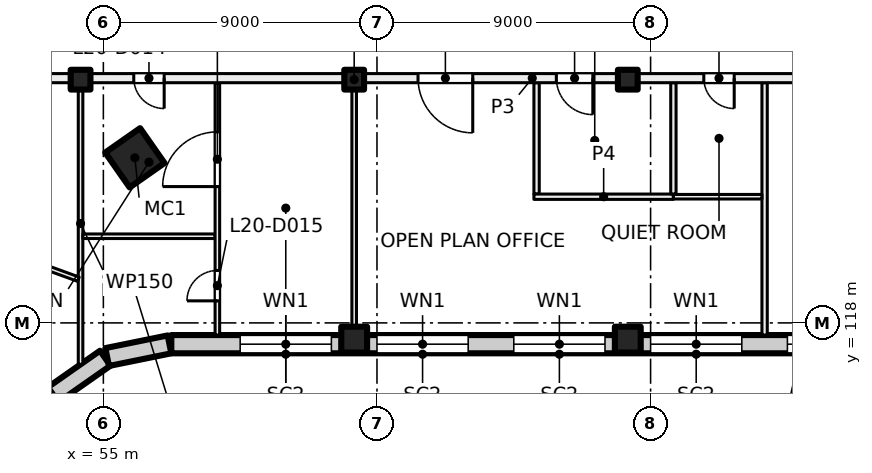
"""IFC4 building model, lengths in metres.
Left out: names, types, materials, properties, quantities, classifications, styles, units other than length and angle.
Written with IfcOpenShell. Run it as: python <this file> out.ifc"""

import sys

from ifc_helpers import new_model, si_unit, direction, frame, frame_2d, origin, origin_2d, place, context, subcontext, project, spatial, rectangle, hollow_rectangle, extrude, element, fill, save


model = new_model("IFC4")
c1 = context("Model", 3, precision=1e-05, world=origin(), true_north=direction((0.0, 1.0)))
c2 = subcontext(c1, "Body", "Model", "MODEL_VIEW")
j1 = project(units=[si_unit("LENGTHUNIT", "METRE"), si_unit("PLANEANGLEUNIT", "RADIAN")], contexts=[c1])
p1 = place(None, origin())
s1 = spatial("IfcSite", under=j1, at=p1, CompositionType="ELEMENT")
p2 = place(p1, origin())
s2 = spatial("IfcBuilding", under=s1, at=p2, CompositionType="ELEMENT")
p3 = place(p2, frame((0.0, 0.0, 89.0)))
s3 = spatial("IfcBuildingStorey", under=s2, at=p3, CompositionType="ELEMENT", Elevation=89.0)
p4 = place(p3, frame((56.036, 123.43, 0.0), z_axis=(0.0, 0.0, 1.0), x_axis=(0.573576436351, -0.819152044289, 0.0)))
e1 = element("IfcColumn", 1, at=p4, inside=s3, PredefinedType="COLUMN", context=c2, shape_type="SweptSolid", body=[
    extrude(hollow_rectangle(XDim=1.4, YDim=1.4, WallThickness=0.04, at=origin_2d()), origin(), (0.0, 0.0, 1.0), 4.0),
])
for number, where, z_axis, x_axis in (
    (2, (54.25, 126.0, 0.0), (0.0, 0.0, 1.0), (1.0, 0.0, 0.0)),
    (3, (63.25, 126.0, 0.0), (0.0, 0.0, 1.0), (1.0, 0.0, 0.0)),
    (4, (72.25, 126.0, 0.0), (0.0, 0.0, 1.0), (1.0, 0.0, 0.0)),
):
    element("IfcColumn", number, at=place(p3, frame(where, z_axis=z_axis, x_axis=x_axis)), inside=s3, PredefinedType="COLUMN", context=c2, shape_type="SweptSolid", body=[
        extrude(rectangle(XDim=0.65, YDim=0.65, at=origin_2d()), origin(), (0.0, 0.0, 1.0), 4.0),
    ])
for number, where, z_axis, x_axis in (
    (5, (63.25, 117.45, 0.0), (0.0, 0.0, 1.0), (1.0, 0.0, 0.0)),
    (6, (72.25, 117.45, 0.0), (0.0, 0.0, 1.0), (1.0, 0.0, 0.0)),
):
    element("IfcColumn", number, at=place(p3, frame(where, z_axis=z_axis, x_axis=x_axis)), inside=s3, PredefinedType="COLUMN", context=c2, shape_type="SweptSolid", body=[
        extrude(rectangle(XDim=0.85, YDim=0.85, at=origin_2d()), origin(), (0.0, 0.0, 1.0), 4.0),
    ])
p5 = place(p3, frame((53.305, 115.578, 0.0), z_axis=(0.0, 0.0, 1.0), x_axis=(-0.522402266438, -0.852699168535, 0.0)))
e7 = element("IfcWall", 7, at=p5, inside=s3, PredefinedType="SOLIDWALL", context=c2, shape_type="SweptSolid", body=[
    extrude(rectangle(XDim=2.042, YDim=0.6, at=frame_2d((1.021, 0.0))), origin(), (0.0, 0.0, 1.0), 3.625),
])
for number, where, z_axis, x_axis in (
    (8, (55.062, 116.839, 0.0), (0.0, 0.0, 1.0), (-0.819, -0.574, 0.0)),
    (9, (57.175, 117.294, 0.0), (0.0, 0.0, 1.0), (-0.98, -0.199, 0.0)),
):
    element("IfcWall", number, at=place(p3, frame(where, z_axis=z_axis, x_axis=x_axis)), inside=s3, PredefinedType="SOLIDWALL", context=c2, shape_type="SweptSolid", body=[
        extrude(rectangle(XDim=2.092, YDim=0.6, at=frame_2d((1.046, 0.0))), origin(), (0.0, 0.0, 1.0), 3.625),
    ])
p6 = place(p3, frame((90.98, 117.3, 0.0), z_axis=(0.0, 0.0, 1.0), x_axis=(-1.0, 0.0, 0.0)))
e10 = element("IfcWall", 10, at=p6, inside=s3, PredefinedType="SOLIDWALL", context=c2, shape_type="SweptSolid", body=[
    extrude(rectangle(XDim=33.745, YDim=0.6, at=frame_2d((16.873, 0.0))), origin(), (0.0, 0.0, 1.0), 3.625),
])
p7 = place(p6, frame((1.48, 0.0, 0.9)))
e11 = element("IfcOpeningElement", 11, at=p7, cuts=e10, PredefinedType="OPENING", context=c2, shape_type="SweptSolid", body=[
    extrude(rectangle(XDim=3.0, YDim=2.4, at=frame_2d((1.5, 1.2))), frame((0.0, 0.31, 0.0), z_axis=(0.0, -1.0, 0.0), x_axis=(1.0, 0.0, 0.0)), (0.0, 0.0, 1.0), 0.62),
])
p8 = place(p6, frame((5.98, 0.0, 0.9)))
e12 = element("IfcOpeningElement", 12, at=p8, cuts=e10, PredefinedType="OPENING", context=c2, shape_type="SweptSolid", body=[
    extrude(rectangle(XDim=3.0, YDim=2.4, at=frame_2d((1.5, 1.2))), frame((0.0, 0.31, 0.0), z_axis=(0.0, -1.0, 0.0), x_axis=(1.0, 0.0, 0.0)), (0.0, 0.0, 1.0), 0.62),
])
p9 = place(p6, frame((10.48, 0.0, 0.9)))
e13 = element("IfcOpeningElement", 13, at=p9, cuts=e10, PredefinedType="OPENING", context=c2, shape_type="SweptSolid", body=[
    extrude(rectangle(XDim=3.0, YDim=2.4, at=frame_2d((1.5, 1.2))), frame((0.0, 0.31, 0.0), z_axis=(0.0, -1.0, 0.0), x_axis=(1.0, 0.0, 0.0)), (0.0, 0.0, 1.0), 0.62),
])
p10 = place(p6, frame((14.98, 0.0, 0.9)))
e14 = element("IfcOpeningElement", 14, at=p10, cuts=e10, PredefinedType="OPENING", context=c2, shape_type="SweptSolid", body=[
    extrude(rectangle(XDim=3.0, YDim=2.4, at=frame_2d((1.5, 1.2))), frame((0.0, 0.31, 0.0), z_axis=(0.0, -1.0, 0.0), x_axis=(1.0, 0.0, 0.0)), (0.0, 0.0, 1.0), 0.62),
])
p11 = place(p6, frame((19.48, 0.0, 0.9)))
e15 = element("IfcOpeningElement", 15, at=p11, cuts=e10, PredefinedType="OPENING", context=c2, shape_type="SweptSolid", body=[
    extrude(rectangle(XDim=3.0, YDim=2.4, at=frame_2d((1.5, 1.2))), frame((0.0, 0.31, 0.0), z_axis=(0.0, -1.0, 0.0), x_axis=(1.0, 0.0, 0.0)), (0.0, 0.0, 1.0), 0.62),
])
p12 = place(p6, frame((23.98, 0.0, 0.9)))
e16 = element("IfcOpeningElement", 16, at=p12, cuts=e10, PredefinedType="OPENING", context=c2, shape_type="SweptSolid", body=[
    extrude(rectangle(XDim=3.0, YDim=2.4, at=frame_2d((1.5, 1.2))), frame((0.0, 0.31, 0.0), z_axis=(0.0, -1.0, 0.0), x_axis=(1.0, 0.0, 0.0)), (0.0, 0.0, 1.0), 0.62),
])
p13 = place(p6, frame((28.48, 0.0, 0.9)))
e17 = element("IfcOpeningElement", 17, at=p13, cuts=e10, PredefinedType="OPENING", context=c2, shape_type="SweptSolid", body=[
    extrude(rectangle(XDim=3.0, YDim=2.4, at=frame_2d((1.5, 1.2))), frame((0.0, 0.31, 0.0), z_axis=(0.0, -1.0, 0.0), x_axis=(1.0, 0.0, 0.0)), (0.0, 0.0, 1.0), 0.62),
])
p14 = place(p3, frame((54.25, 116.637, 0.0), z_axis=(0.0, 0.0, 1.0), x_axis=(0.0, 1.0, 0.0)))
e18 = element("IfcWall", 18, at=p14, inside=s3, PredefinedType="PARTITIONING", context=c2, shape_type="SweptSolid", body=[
    extrude(rectangle(XDim=9.263, YDim=0.15, at=frame_2d((4.631, 0.0))), origin(), (0.0, 0.0, 1.0), 3.625),
])
p15 = place(p3, frame((54.18, 119.436, 0.0), z_axis=(0.0, 0.0, 1.0), x_axis=(-0.939669476286, 0.342083725624, 0.0)))
e19 = element("IfcWall", 19, at=p15, inside=s3, PredefinedType="PARTITIONING", context=c2, shape_type="SweptSolid", body=[
    extrude(rectangle(XDim=8.516, YDim=0.15, at=frame_2d((4.258, 0.0))), origin(), (0.0, 0.0, 1.0), 3.625),
])
p16 = place(p3, frame((54.325, 120.85, 0.0), z_axis=(0.0, 0.0, 1.0), x_axis=(1.0, 0.0, 0.0)))
e20 = element("IfcWall", 20, at=p16, inside=s3, PredefinedType="PARTITIONING", context=c2, shape_type="SweptSolid", body=[
    extrude(rectangle(XDim=4.35, YDim=0.15, at=frame_2d((2.175, 0.0))), origin(), (0.0, 0.0, 1.0), 3.625),
])
p17 = place(p3, frame((58.75, 117.6, 0.0), z_axis=(0.0, 0.0, 1.0), x_axis=(0.0, 1.0, 0.0)))
e21 = element("IfcWall", 21, at=p17, inside=s3, PredefinedType="PARTITIONING", context=c2, shape_type="SweptSolid", body=[
    extrude(rectangle(XDim=8.3, YDim=0.15, at=frame_2d((4.15, 0.0))), origin(), (0.0, 0.0, 1.0), 3.625),
])
p18 = place(p17, frame((1.125, 0.0, 0.0)))
e22 = element("IfcOpeningElement", 22, at=p18, cuts=e21, PredefinedType="OPENING", context=c2, shape_type="SweptSolid", body=[
    extrude(rectangle(XDim=1.0, YDim=2.1, at=frame_2d((0.5, 1.05))), frame((0.0, 0.085, 0.0), z_axis=(0.0, -1.0, 0.0), x_axis=(1.0, 0.0, 0.0)), (0.0, 0.0, 1.0), 0.17),
])
p19 = place(p17, frame((4.884, 0.0, 0.0)))
e23 = element("IfcOpeningElement", 23, at=p19, cuts=e21, PredefinedType="OPENING", context=c2, shape_type="SweptSolid", body=[
    extrude(rectangle(XDim=1.8, YDim=2.1, at=frame_2d((0.9, 1.05))), frame((0.0, 0.085, 0.0), z_axis=(0.0, -1.0, 0.0), x_axis=(1.0, 0.0, 0.0)), (0.0, 0.0, 1.0), 0.17),
])
p20 = place(p3, frame((63.25, 117.6, 0.0), z_axis=(0.0, 0.0, 1.0), x_axis=(0.0, 1.0, 0.0)))
e24 = element("IfcWall", 24, at=p20, inside=s3, PredefinedType="PARTITIONING", context=c2, shape_type="SweptSolid", body=[
    extrude(rectangle(XDim=8.3, YDim=0.15, at=frame_2d((4.15, 0.0))), origin(), (0.0, 0.0, 1.0), 3.625),
])
p21 = place(p3, frame((69.25, 122.238, 0.0), z_axis=(0.0, 0.0, 1.0), x_axis=(0.0, 1.0, 0.0)))
e25 = element("IfcWall", 25, at=p21, inside=s3, PredefinedType="PARTITIONING", context=c2, shape_type="SweptSolid", body=[
    extrude(rectangle(XDim=3.662, YDim=0.175, at=frame_2d((1.831, 0.0))), origin(), (0.0, 0.0, 1.0), 3.625),
])
p22 = place(p3, frame((73.75, 122.15, 0.0), z_axis=(0.0, 0.0, 1.0), x_axis=(-1.0, 0.0, 0.0)))
e26 = element("IfcWall", 26, at=p22, inside=s3, PredefinedType="PARTITIONING", context=c2, shape_type="SweptSolid", body=[
    extrude(rectangle(XDim=4.588, YDim=0.175, at=frame_2d((2.294, 0.0))), origin(), (0.0, 0.0, 1.0), 3.625),
])
p23 = place(p3, frame((73.75, 125.9, 0.0), z_axis=(0.0, 0.0, 1.0), x_axis=(0.0, -1.0, 0.0)))
e27 = element("IfcWall", 27, at=p23, inside=s3, PredefinedType="PARTITIONING", context=c2, shape_type="SweptSolid", body=[
    extrude(rectangle(XDim=3.662, YDim=0.175, at=frame_2d((1.831, 0.0))), origin(), (0.0, 0.0, 1.0), 3.625),
])
p24 = place(p3, frame((76.75, 117.6, 0.0), z_axis=(0.0, 0.0, 1.0), x_axis=(0.0, 1.0, 0.0)))
e28 = element("IfcWall", 28, at=p24, inside=s3, PredefinedType="PARTITIONING", context=c2, shape_type="SweptSolid", body=[
    extrude(rectangle(XDim=8.3, YDim=0.175, at=frame_2d((4.15, 0.0))), origin(), (0.0, 0.0, 1.0), 3.625),
])
p25 = place(p3, frame((76.662, 122.15, 0.0), z_axis=(0.0, 0.0, 1.0), x_axis=(-1.0, 0.0, 0.0)))
e29 = element("IfcWall", 29, at=p25, inside=s3, PredefinedType="PARTITIONING", context=c2, shape_type="SweptSolid", body=[
    extrude(rectangle(XDim=2.912, YDim=0.15, at=frame_2d((1.456, 0.0))), origin(), (0.0, 0.0, 1.0), 3.625),
])
p26 = place(p3, frame((91.0, 126.05, 0.0), z_axis=(0.0, 0.0, 1.0), x_axis=(-1.0, 0.0, 0.0)))
e30 = element("IfcWall", 30, at=p26, inside=s3, PredefinedType="PARTITIONING", context=c2, shape_type="SweptSolid", body=[
    extrude(rectangle(XDim=43.785, YDim=0.3, at=frame_2d((21.893, 0.0))), origin(), (0.0, 0.0, 1.0), 3.625),
])
p27 = place(p26, frame((2.025, 0.0, 0.0)))
e31 = element("IfcOpeningElement", 31, at=p27, cuts=e30, PredefinedType="OPENING", context=c2, shape_type="SweptSolid", body=[
    extrude(rectangle(XDim=1.2, YDim=2.1, at=frame_2d((0.6, 1.05))), frame((0.0, 0.16, 0.0), z_axis=(0.0, -1.0, 0.0), x_axis=(1.0, 0.0, 0.0)), (0.0, 0.0, 1.0), 0.32),
])
p28 = place(p26, frame((6.9, 0.0, 0.0)))
e32 = element("IfcOpeningElement", 32, at=p28, cuts=e30, PredefinedType="OPENING", context=c2, shape_type="SweptSolid", body=[
    extrude(rectangle(XDim=1.2, YDim=2.1, at=frame_2d((0.6, 1.05))), frame((0.0, 0.16, 0.0), z_axis=(0.0, -1.0, 0.0), x_axis=(1.0, 0.0, 0.0)), (0.0, 0.0, 1.0), 0.32),
])
p29 = place(p26, frame((11.4, 0.0, 0.0)))
e33 = element("IfcOpeningElement", 33, at=p29, cuts=e30, PredefinedType="OPENING", context=c2, shape_type="SweptSolid", body=[
    extrude(rectangle(XDim=1.2, YDim=2.1, at=frame_2d((0.6, 1.05))), frame((0.0, 0.16, 0.0), z_axis=(0.0, -1.0, 0.0), x_axis=(1.0, 0.0, 0.0)), (0.0, 0.0, 1.0), 0.32),
])
p30 = place(p26, frame((15.25, 0.0, 0.0)))
e34 = element("IfcOpeningElement", 34, at=p30, cuts=e30, PredefinedType="OPENING", context=c2, shape_type="SweptSolid", body=[
    extrude(rectangle(XDim=1.0, YDim=2.1, at=frame_2d((0.5, 1.05))), frame((0.0, 0.16, 0.0), z_axis=(0.0, -1.0, 0.0), x_axis=(1.0, 0.0, 0.0)), (0.0, 0.0, 1.0), 0.32),
])
p31 = place(p26, frame((19.9, 0.0, 0.0)))
e35 = element("IfcOpeningElement", 35, at=p31, cuts=e30, PredefinedType="OPENING", context=c2, shape_type="SweptSolid", body=[
    extrude(rectangle(XDim=1.2, YDim=2.1, at=frame_2d((0.6, 1.05))), frame((0.0, 0.16, 0.0), z_axis=(0.0, -1.0, 0.0), x_axis=(1.0, 0.0, 0.0)), (0.0, 0.0, 1.0), 0.32),
])
p32 = place(p26, frame((23.85, 0.0, 0.0)))
e36 = element("IfcOpeningElement", 36, at=p32, cuts=e30, PredefinedType="OPENING", context=c2, shape_type="SweptSolid", body=[
    extrude(rectangle(XDim=1.8, YDim=2.1, at=frame_2d((0.9, 1.05))), frame((0.0, 0.16, 0.0), z_axis=(0.0, -1.0, 0.0), x_axis=(1.0, 0.0, 0.0)), (0.0, 0.0, 1.0), 0.32),
])
p33 = place(p26, frame((34.0, 0.0, 0.0)))
e37 = element("IfcOpeningElement", 37, at=p33, cuts=e30, PredefinedType="OPENING", context=c2, shape_type="SweptSolid", body=[
    extrude(rectangle(XDim=1.0, YDim=2.1, at=frame_2d((0.5, 1.05))), frame((0.0, 0.16, 0.0), z_axis=(0.0, -1.0, 0.0), x_axis=(1.0, 0.0, 0.0)), (0.0, 0.0, 1.0), 0.32),
])
p34 = place(p26, frame((39.296, 0.0, 0.0)))
e38 = element("IfcOpeningElement", 38, at=p34, cuts=e30, PredefinedType="OPENING", context=c2, shape_type="SweptSolid", body=[
    extrude(rectangle(XDim=1.8, YDim=2.1, at=frame_2d((0.9, 1.05))), frame((0.0, 0.16, 0.0), z_axis=(0.0, -1.0, 0.0), x_axis=(1.0, 0.0, 0.0)), (0.0, 0.0, 1.0), 0.32),
])
p35 = place(p9, origin())
e39 = element("IfcWindow", 39, at=p35, inside=s3, PartitioningType="SINGLE_PANEL", PredefinedType="WINDOW", context=c2, shape_type="SweptSolid", body=[
    extrude(rectangle(XDim=3.0, YDim=2.4, at=frame_2d((1.5, 1.2))), frame((0.0, 0.03, 0.0), z_axis=(0.0, -1.0, 0.0), x_axis=(1.0, 0.0, 0.0)), (0.0, 0.0, 1.0), 0.06),
])
fill(e13, e39)
p36 = place(p10, origin())
e40 = element("IfcWindow", 40, at=p36, inside=s3, PartitioningType="SINGLE_PANEL", PredefinedType="WINDOW", context=c2, shape_type="SweptSolid", body=[
    extrude(rectangle(XDim=3.0, YDim=2.4, at=frame_2d((1.5, 1.2))), frame((0.0, 0.03, 0.0), z_axis=(0.0, -1.0, 0.0), x_axis=(1.0, 0.0, 0.0)), (0.0, 0.0, 1.0), 0.06),
])
fill(e14, e40)
p37 = place(p11, origin())
e41 = element("IfcWindow", 41, at=p37, inside=s3, PartitioningType="SINGLE_PANEL", PredefinedType="WINDOW", context=c2, shape_type="SweptSolid", body=[
    extrude(rectangle(XDim=3.0, YDim=2.4, at=frame_2d((1.5, 1.2))), frame((0.0, 0.03, 0.0), z_axis=(0.0, -1.0, 0.0), x_axis=(1.0, 0.0, 0.0)), (0.0, 0.0, 1.0), 0.06),
])
fill(e15, e41)
p38 = place(p12, origin())
e42 = element("IfcWindow", 42, at=p38, inside=s3, PartitioningType="SINGLE_PANEL", PredefinedType="WINDOW", context=c2, shape_type="SweptSolid", body=[
    extrude(rectangle(XDim=3.0, YDim=2.4, at=frame_2d((1.5, 1.2))), frame((0.0, 0.03, 0.0), z_axis=(0.0, -1.0, 0.0), x_axis=(1.0, 0.0, 0.0)), (0.0, 0.0, 1.0), 0.06),
])
fill(e16, e42)
p39 = place(p13, origin())
e43 = element("IfcWindow", 43, at=p39, inside=s3, PartitioningType="SINGLE_PANEL", PredefinedType="WINDOW", context=c2, shape_type="SweptSolid", body=[
    extrude(rectangle(XDim=3.0, YDim=2.4, at=frame_2d((1.5, 1.2))), frame((0.0, 0.03, 0.0), z_axis=(0.0, -1.0, 0.0), x_axis=(1.0, 0.0, 0.0)), (0.0, 0.0, 1.0), 0.06),
])
fill(e17, e43)
p40 = place(p30, origin())
e44 = element("IfcDoor", 44, at=p40, inside=s3, OperationType="SINGLE_SWING_LEFT", PredefinedType="DOOR", context=c2, shape_type="SweptSolid", body=[
    extrude(rectangle(XDim=1.0, YDim=2.1, at=frame_2d((0.5, 1.05))), frame((0.0, 0.025, 0.0), z_axis=(0.0, -1.0, 0.0), x_axis=(1.0, 0.0, 0.0)), (0.0, 0.0, 1.0), 0.05),
])
fill(e34, e44)
p41 = place(p31, origin())
e45 = element("IfcDoor", 45, at=p41, inside=s3, OperationType="DOUBLE_DOOR_SINGLE_SWING", PredefinedType="DOOR", context=c2, shape_type="SweptSolid", body=[
    extrude(rectangle(XDim=1.2, YDim=2.1, at=frame_2d((0.6, 1.05))), frame((0.0, 0.025, 0.0), z_axis=(0.0, -1.0, 0.0), x_axis=(1.0, 0.0, 0.0)), (0.0, 0.0, 1.0), 0.05),
])
fill(e35, e45)
p42 = place(p32, origin())
e46 = element("IfcDoor", 46, at=p42, inside=s3, OperationType="DOUBLE_DOOR_SINGLE_SWING", PredefinedType="DOOR", context=c2, shape_type="SweptSolid", body=[
    extrude(rectangle(XDim=1.8, YDim=2.1, at=frame_2d((0.9, 1.05))), frame((0.0, 0.025, 0.0), z_axis=(0.0, -1.0, 0.0), x_axis=(1.0, 0.0, 0.0)), (0.0, 0.0, 1.0), 0.05),
])
fill(e36, e46)
p43 = place(p33, origin())
e47 = element("IfcDoor", 47, at=p43, inside=s3, OperationType="SINGLE_SWING_LEFT", PredefinedType="DOOR", context=c2, shape_type="SweptSolid", body=[
    extrude(rectangle(XDim=1.0, YDim=2.1, at=frame_2d((0.5, 1.05))), frame((0.0, 0.025, 0.0), z_axis=(0.0, -1.0, 0.0), x_axis=(1.0, 0.0, 0.0)), (0.0, 0.0, 1.0), 0.05),
])
fill(e37, e47)
p44 = place(p18, origin())
e48 = element("IfcDoor", 48, at=p44, inside=s3, OperationType="SINGLE_SWING_RIGHT", PredefinedType="DOOR", context=c2, shape_type="SweptSolid", body=[
    extrude(rectangle(XDim=1.0, YDim=2.1, at=frame_2d((0.5, 1.05))), frame((0.0, 0.025, 0.0), z_axis=(0.0, -1.0, 0.0), x_axis=(1.0, 0.0, 0.0)), (0.0, 0.0, 1.0), 0.05),
])
fill(e22, e48)
p45 = place(p19, origin())
e49 = element("IfcDoor", 49, at=p45, inside=s3, OperationType="DOUBLE_DOOR_SINGLE_SWING", PredefinedType="DOOR", context=c2, shape_type="SweptSolid", body=[
    extrude(rectangle(XDim=1.8, YDim=2.1, at=frame_2d((0.9, 1.05))), frame((0.0, 0.025, 0.0), z_axis=(0.0, -1.0, 0.0), x_axis=(1.0, 0.0, 0.0)), (0.0, 0.0, 1.0), 0.05),
])
fill(e23, e49)
save(model, sys.argv[1])
